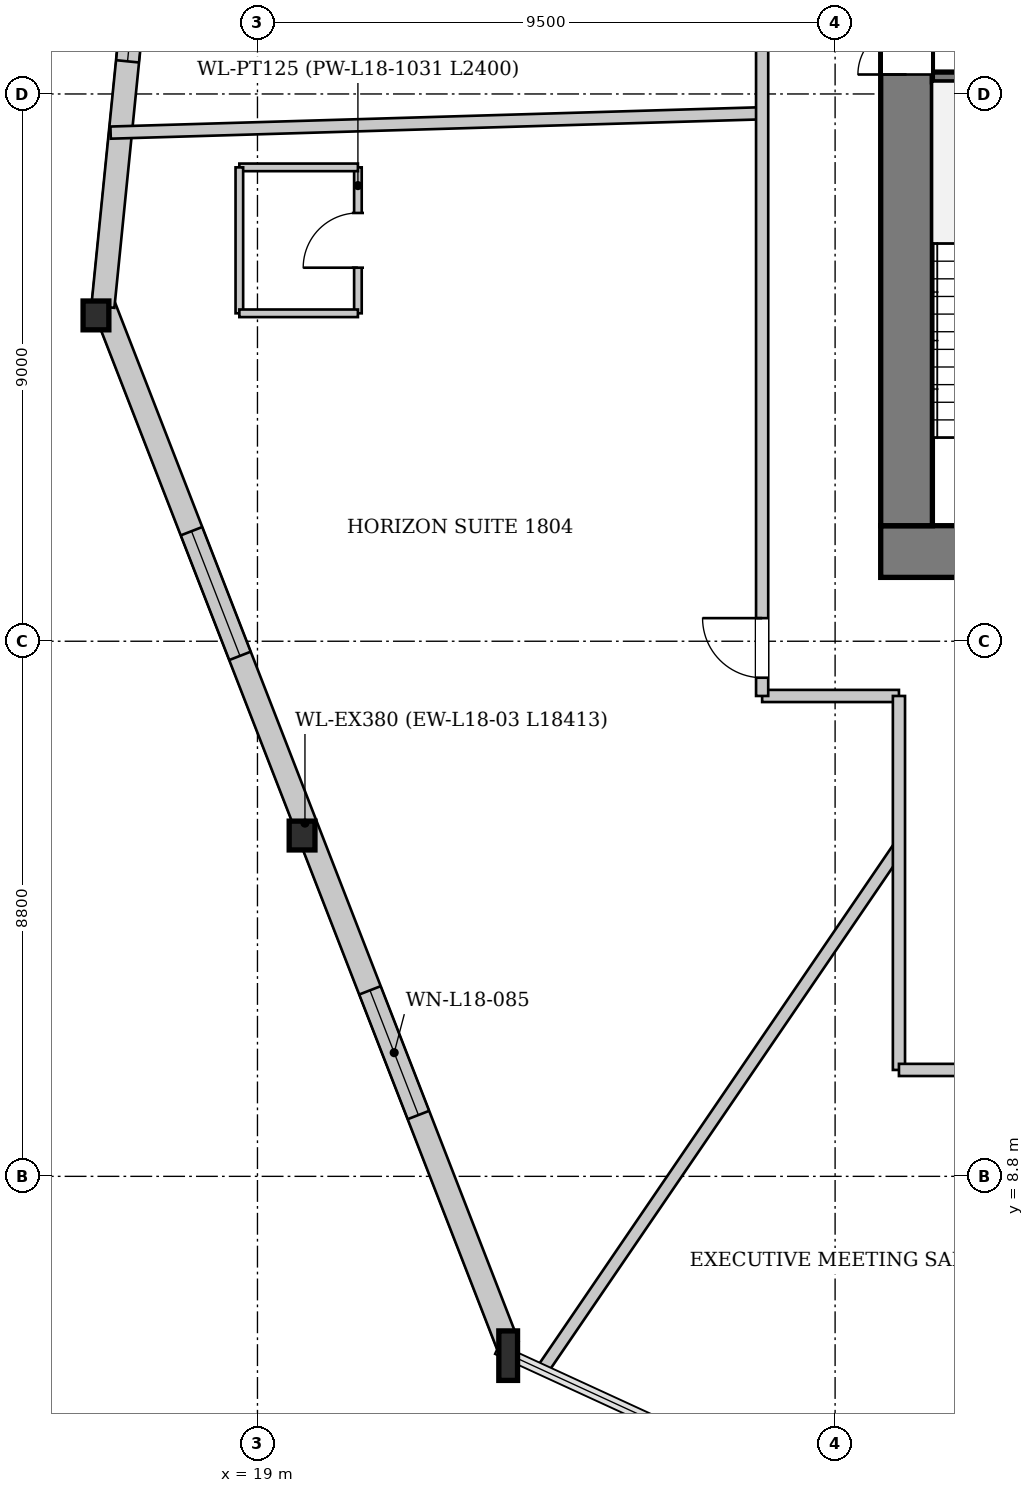
"""IFC4 building model, lengths in metres.
Left out: names, types, materials, properties, quantities, classifications, styles, units other than length and angle.
Written with IfcOpenShell. Run it as: python <this file> out.ifc"""

import sys

from ifc_helpers import new_model, si_unit, direction, frame, frame_2d, origin, origin_2d, place, context, subcontext, project, spatial, rectangle, i_section, extrude, source, transform, mapped, element, fill, save


model = new_model("IFC4")
c1 = context("Model", 3, precision=1e-05, world=origin(), true_north=direction((0.0, 1.0)))
c2 = subcontext(c1, "Body", "Model", "MODEL_VIEW")
j1 = project(units=[si_unit("LENGTHUNIT", "METRE"), si_unit("PLANEANGLEUNIT", "RADIAN")], contexts=[c1])
p1 = place(None, origin())
s1 = spatial("IfcSite", under=j1, at=p1, CompositionType="ELEMENT")
p2 = place(p1, origin())
s2 = spatial("IfcBuilding", under=s1, at=p2, CompositionType="ELEMENT")
p3 = place(p2, frame((0.0, 0.0, 71.9)))
s3 = spatial("IfcBuildingStorey", under=s2, at=p3, CompositionType="ELEMENT", Elevation=71.9)
m1 = source(origin(), c2, "Body", "SweptSolid", [
    extrude(i_section(OverallWidth=0.424, OverallDepth=0.474, WebThickness=0.043, FlangeThickness=0.068, at=origin_2d()), origin(), (0.0, 0.0, 1.0), 3.852),
])
p4 = place(p3, frame((16.269, 23.121, 0.0), z_axis=(0.039042769409, -0.084550412974, 0.995654001058), x_axis=(0.907879691662, 0.419230802147, 0.0)))
e1 = element("IfcColumn", 1, at=p4, inside=s3, PredefinedType="COLUMN", context=c2, shape_type="MappedRepresentation", body=[
    mapped(m1, transform((0.0, 0.0, 0.0), x_axis=(1.0, 0.0, 0.0), y_axis=(0.0, 1.0, 0.0), z_axis=(0.0, 0.0, 1.0), scale=1.0)),
])
m2 = source(origin(), c2, "Body", "SweptSolid", [
    extrude(i_section(OverallWidth=0.424, OverallDepth=0.474, WebThickness=0.043, FlangeThickness=0.068, at=origin_2d()), origin(), (0.0, 0.0, 1.0), 3.854),
])
p5 = place(p3, frame((19.604, 14.54, 0.0), z_axis=(0.067283898788, -0.070261623122, 0.995256841866), x_axis=(0.722245711636, 0.691636560647, 0.0)))
e2 = element("IfcColumn", 2, at=p5, inside=s3, PredefinedType="COLUMN", context=c2, shape_type="MappedRepresentation", body=[
    mapped(m2, transform((0.0, 0.0, 0.0), x_axis=(1.0, 0.0, 0.0), y_axis=(0.0, 1.0, 0.0), z_axis=(0.0, 0.0, 1.0), scale=1.0)),
])
m3 = source(origin(), c2, "Body", "SweptSolid", [
    extrude(i_section(OverallWidth=0.308, OverallDepth=0.814, WebThickness=0.021, FlangeThickness=0.04, at=origin_2d()), origin(), (0.0, 0.0, 1.0), 3.859),
])
p6 = place(p3, frame((22.939, 5.959, 0.0), z_axis=(0.095281359124, -0.055992033748, 0.99387441599), x_axis=(0.506644802413, 0.862154884106, 0.0)))
e3 = element("IfcColumn", 3, at=p6, inside=s3, PredefinedType="COLUMN", context=c2, shape_type="MappedRepresentation", body=[
    mapped(m3, transform((0.0, 0.0, 0.0), x_axis=(1.0, 0.0, 0.0), y_axis=(0.0, 1.0, 0.0), z_axis=(0.0, 0.0, 1.0), scale=1.0)),
])
p7 = place(p3, frame((23.116, 6.028, 0.0), z_axis=(0.0, 0.0, 1.0), x_axis=(-0.362290127774, 0.932065375023, 0.0)))
e4 = element("IfcWall", 4, at=p7, inside=s3, PredefinedType="SOLIDWALL", context=c2, shape_type="SweptSolid", body=[
    extrude(rectangle(XDim=18.412, YDim=0.38, at=frame_2d((9.206, 0.0))), origin(), (0.0, 0.0, 1.0), 3.042),
])
p8 = place(p7, frame((4.056, 0.0, 0.65)))
e5 = element("IfcOpeningElement", 5, at=p8, cuts=e4, PredefinedType="OPENING", context=c2, shape_type="SweptSolid", body=[
    extrude(rectangle(XDim=2.2, YDim=2.25, at=frame_2d((1.1, 1.125))), frame((0.0, 0.2, 0.0), z_axis=(0.0, -1.0, 0.0), x_axis=(1.0, 0.0, 0.0)), (0.0, 0.0, 1.0), 0.4),
])
p9 = place(p7, frame((12.157, 0.0, 0.65)))
e6 = element("IfcOpeningElement", 6, at=p9, cuts=e4, PredefinedType="OPENING", context=c2, shape_type="SweptSolid", body=[
    extrude(rectangle(XDim=2.2, YDim=2.25, at=frame_2d((1.1, 1.125))), frame((0.0, 0.2, 0.0), z_axis=(0.0, -1.0, 0.0), x_axis=(1.0, 0.0, 0.0)), (0.0, 0.0, 1.0), 0.4),
])
p10 = place(p3, frame((16.458, 23.102, 0.0), z_axis=(0.0, 0.0, 1.0), x_axis=(0.099977641191, 0.994989683998, 0.0)))
e7 = element("IfcWall", 7, at=p10, inside=s3, PredefinedType="SOLIDWALL", context=c2, shape_type="SweptSolid", body=[
    extrude(rectangle(XDim=18.412, YDim=0.38, at=frame_2d((9.206, 0.0))), origin(), (0.0, 0.0, 1.0), 3.042),
])
p11 = place(p10, frame((4.055, 0.0, 0.65)))
e8 = element("IfcOpeningElement", 8, at=p11, cuts=e7, PredefinedType="OPENING", context=c2, shape_type="SweptSolid", body=[
    extrude(rectangle(XDim=2.2, YDim=2.25, at=frame_2d((1.1, 1.125))), frame((0.0, 0.2, 0.0), z_axis=(0.0, -1.0, 0.0), x_axis=(1.0, 0.0, 0.0)), (0.0, 0.0, 1.0), 0.4),
])
p12 = place(p10, frame((12.157, 0.0, 0.65)))
e9 = element("IfcOpeningElement", 9, at=p12, cuts=e7, PredefinedType="OPENING", context=c2, shape_type="SweptSolid", body=[
    extrude(rectangle(XDim=2.2, YDim=2.25, at=frame_2d((1.1, 1.125))), frame((0.0, 0.2, 0.0), z_axis=(0.0, -1.0, 0.0), x_axis=(1.0, 0.0, 0.0)), (0.0, 0.0, 1.0), 0.4),
])
p13 = place(p3, frame((46.75, 19.075, 0.0), z_axis=(0.0, 0.0, 1.0), x_axis=(-1.0, 0.0, 0.0)))
e10 = element("IfcWall", 10, at=p13, inside=s3, PredefinedType="SHEAR", context=c2, shape_type="SweptSolid", body=[
    extrude(rectangle(XDim=17.5, YDim=0.85, at=frame_2d((8.75, 0.0))), origin(), (0.0, 0.0, 1.0), 3.75),
])
p14 = place(p13, frame((4.95, 0.0, 0.0)))
e11 = element("IfcOpeningElement", 11, at=p14, cuts=e10, PredefinedType="OPENING", context=c2, shape_type="SweptSolid", body=[
    extrude(rectangle(XDim=1.12, YDim=2.25, at=frame_2d((0.56, 1.125))), frame((0.0, 0.435, 0.0), z_axis=(0.0, -1.0, 0.0), x_axis=(1.0, 0.0, 0.0)), (0.0, 0.0, 1.0), 0.87),
])
p15 = place(p13, frame((11.45, 0.0, 0.0)))
e12 = element("IfcOpeningElement", 12, at=p15, cuts=e10, PredefinedType="OPENING", context=c2, shape_type="SweptSolid", body=[
    extrude(rectangle(XDim=1.12, YDim=2.25, at=frame_2d((0.56, 1.125))), frame((0.0, 0.435, 0.0), z_axis=(0.0, -1.0, 0.0), x_axis=(1.0, 0.0, 0.0)), (0.0, 0.0, 1.0), 0.87),
])
p16 = place(p3, frame((29.675, 19.5, 0.0), z_axis=(0.0, 0.0, 1.0), x_axis=(0.0, 1.0, 0.0)))
e13 = element("IfcWall", 13, at=p16, inside=s3, PredefinedType="SHEAR", context=c2, shape_type="SweptSolid", body=[
    extrude(rectangle(XDim=14.2, YDim=0.85, at=frame_2d((7.1, 0.0))), origin(), (0.0, 0.0, 1.0), 3.75),
])
p17 = place(p16, frame((7.42, 0.0, 0.0)))
e14 = element("IfcOpeningElement", 14, at=p17, cuts=e13, PredefinedType="OPENING", context=c2, shape_type="SweptSolid", body=[
    extrude(rectangle(XDim=1.6, YDim=2.2, at=frame_2d((0.8, 1.1))), frame((0.0, 0.435, 0.0), z_axis=(0.0, -1.0, 0.0), x_axis=(1.0, 0.0, 0.0)), (0.0, 0.0, 1.0), 0.87),
])
p18 = place(p3, frame((30.1, 26.88, 0.0), z_axis=(0.0, 0.0, 1.0), x_axis=(1.0, 0.0, 0.0)))
e15 = element("IfcWall", 15, at=p18, inside=s3, PredefinedType="PARTITIONING", context=c2, shape_type="SweptSolid", body=[
    extrude(rectangle(XDim=3.02, YDim=0.16, at=frame_2d((1.51, 0.0))), origin(), (0.0, 0.0, 1.0), 3.75),
])
p19 = place(p3, frame((27.3, 26.282, 0.0), z_axis=(0.0, 0.0, 1.0), x_axis=(-0.999559606693, -0.029674781671, 0.0)))
e16 = element("IfcWall", 16, at=p19, inside=s3, PredefinedType="PARTITIONING", context=c2, shape_type="SweptSolid", body=[
    extrude(rectangle(XDim=10.72, YDim=0.2, at=frame_2d((5.36, 0.0))), origin(), (0.0, 0.0, 1.0), 3.75),
])
p20 = place(p3, frame((29.55, 14.213, 0.0), z_axis=(0.0, 0.0, 1.0), x_axis=(-0.563519334803, -0.826102874528, 0.0)))
e17 = element("IfcWall", 17, at=p20, inside=s3, PredefinedType="PARTITIONING", context=c2, shape_type="SweptSolid", body=[
    extrude(rectangle(XDim=10.376, YDim=0.2, at=frame_2d((5.188, 0.0))), origin(), (0.0, 0.0, 1.0), 3.245),
])
p21 = place(p3, frame((20.652, 22.993, 0.0), z_axis=(0.0, 0.0, 1.0), x_axis=(0.0, 1.0, 0.0)))
e18 = element("IfcWall", 18, at=p21, inside=s3, PredefinedType="PARTITIONING", context=c2, shape_type="SweptSolid", body=[
    extrude(rectangle(XDim=2.4, YDim=0.125, at=frame_2d((1.2, 0.0))), origin(), (0.0, 0.0, 1.0), 3.75),
])
p22 = place(p21, frame((0.75, 0.0, 0.0)))
e19 = element("IfcOpeningElement", 19, at=p22, cuts=e18, PredefinedType="OPENING", context=c2, shape_type="SweptSolid", body=[
    extrude(rectangle(XDim=0.9, YDim=2.1, at=frame_2d((0.45, 1.05))), frame((0.0, 0.073, 0.0), z_axis=(0.0, -1.0, 0.0), x_axis=(1.0, 0.0, 0.0)), (0.0, 0.0, 1.0), 0.145),
])
p23 = place(p3, frame((20.652, 25.393, 0.0), z_axis=(0.0, 0.0, 1.0), x_axis=(-1.0, 0.0, 0.0)))
e20 = element("IfcWall", 20, at=p23, inside=s3, PredefinedType="PARTITIONING", context=c2, shape_type="SweptSolid", body=[
    extrude(rectangle(XDim=1.95, YDim=0.125, at=frame_2d((0.975, 0.0))), origin(), (0.0, 0.0, 1.0), 3.75),
])
p24 = place(p3, frame((18.702, 25.393, 0.0), z_axis=(0.0, 0.0, 1.0), x_axis=(0.0, -1.0, 0.0)))
e21 = element("IfcWall", 21, at=p24, inside=s3, PredefinedType="PARTITIONING", context=c2, shape_type="SweptSolid", body=[
    extrude(rectangle(XDim=2.4, YDim=0.125, at=frame_2d((1.2, 0.0))), origin(), (0.0, 0.0, 1.0), 3.75),
])
p25 = place(p3, frame((18.702, 22.993, 0.0), z_axis=(0.0, 0.0, 1.0), x_axis=(1.0, 0.0, 0.0)))
e22 = element("IfcWall", 22, at=p25, inside=s3, PredefinedType="PARTITIONING", context=c2, shape_type="SweptSolid", body=[
    extrude(rectangle(XDim=1.95, YDim=0.125, at=frame_2d((0.975, 0.0))), origin(), (0.0, 0.0, 1.0), 3.235),
])
p26 = place(p3, frame((27.3, 16.7, 0.0), z_axis=(0.0, 0.0, 1.0), x_axis=(1.0, 0.0, 0.0)))
e23 = element("IfcWall", 23, at=p26, inside=s3, PredefinedType="PARTITIONING", context=c2, shape_type="SweptSolid", body=[
    extrude(rectangle(XDim=2.25, YDim=0.2, at=frame_2d((1.125, 0.0))), origin(), (0.0, 0.0, 1.0), 3.75),
])
p27 = place(p3, frame((27.3, 16.7, 0.0), z_axis=(0.0, 0.0, 1.0), x_axis=(0.0, 1.0, 0.0)))
e24 = element("IfcWall", 24, at=p27, inside=s3, PredefinedType="PARTITIONING", context=c2, shape_type="SweptSolid", body=[
    extrude(rectangle(XDim=19.8, YDim=0.2, at=frame_2d((9.9, 0.0))), origin(), (0.0, 0.0, 1.0), 3.75),
])
p28 = place(p27, frame((14.2, 0.0, 0.0)))
e25 = element("IfcOpeningElement", 25, at=p28, cuts=e24, PredefinedType="OPENING", context=c2, shape_type="SweptSolid", body=[
    extrude(rectangle(XDim=0.98, YDim=2.15, at=frame_2d((0.49, 1.075))), frame((0.0, 0.11, 0.0), z_axis=(0.0, -1.0, 0.0), x_axis=(1.0, 0.0, 0.0)), (0.0, 0.0, 1.0), 0.22),
])
p29 = place(p27, frame((0.3, 0.0, 0.0)))
e26 = element("IfcOpeningElement", 26, at=p29, cuts=e24, PredefinedType="OPENING", context=c2, shape_type="SweptSolid", body=[
    extrude(rectangle(XDim=0.98, YDim=2.15, at=frame_2d((0.49, 1.075))), frame((0.0, 0.11, 0.0), z_axis=(0.0, -1.0, 0.0), x_axis=(1.0, 0.0, 0.0)), (0.0, 0.0, 1.0), 0.22),
])
p30 = place(p3, frame((29.55, 10.55, 0.0), z_axis=(0.0, 0.0, 1.0), x_axis=(0.0, 1.0, 0.0)))
e27 = element("IfcWall", 27, at=p30, inside=s3, PredefinedType="PARTITIONING", context=c2, shape_type="SweptSolid", body=[
    extrude(rectangle(XDim=6.15, YDim=0.2, at=frame_2d((3.075, 0.0))), origin(), (0.0, 0.0, 1.0), 3.75),
])
p31 = place(p3, frame((29.55, 10.55, 0.0), z_axis=(0.0, 0.0, 1.0), x_axis=(1.0, 0.0, 0.0)))
e28 = element("IfcWall", 28, at=p31, inside=s3, PredefinedType="PARTITIONING", context=c2, shape_type="SweptSolid", body=[
    extrude(rectangle(XDim=10.3, YDim=0.2, at=frame_2d((5.15, 0.0))), origin(), (0.0, 0.0, 1.0), 3.75),
])
m4 = source(origin(), c2, "Body", "SweptSolid", [
    extrude(rectangle(XDim=2.2, YDim=2.25, at=frame_2d((1.1, 1.125))), frame((0.0, 0.03, 0.0), z_axis=(0.0, -1.0, 0.0), x_axis=(1.0, 0.0, 0.0)), (0.0, 0.0, 1.0), 0.06),
])
p32 = place(p8, origin())
e29 = element("IfcWindow", 29, at=p32, inside=s3, PartitioningType="SINGLE_PANEL", PredefinedType="WINDOW", context=c2, shape_type="MappedRepresentation", body=[
    mapped(m4, transform((0.0, 0.0, 0.0), x_axis=(1.0, 0.0, 0.0), y_axis=(0.0, 1.0, 0.0), z_axis=(0.0, 0.0, 1.0), scale=1.0)),
])
fill(e5, e29)
p33 = place(p9, origin())
e30 = element("IfcWindow", 30, at=p33, inside=s3, PartitioningType="SINGLE_PANEL", PredefinedType="WINDOW", context=c2, shape_type="MappedRepresentation", body=[
    mapped(m4, transform((0.0, 0.0, 0.0), x_axis=(1.0, 0.0, 0.0), y_axis=(0.0, 1.0, 0.0), z_axis=(0.0, 0.0, 1.0), scale=1.0)),
])
fill(e6, e30)
p34 = place(p11, origin())
e31 = element("IfcWindow", 31, at=p34, inside=s3, PartitioningType="SINGLE_PANEL", PredefinedType="WINDOW", context=c2, shape_type="MappedRepresentation", body=[
    mapped(m4, transform((0.0, 0.0, 0.0), x_axis=(1.0, 0.0, 0.0), y_axis=(0.0, 1.0, 0.0), z_axis=(0.0, 0.0, 1.0), scale=1.0)),
])
fill(e8, e31)
m5 = source(origin(), c2, "Body", "SweptSolid", [
    extrude(rectangle(XDim=1.6, YDim=2.2, at=frame_2d((0.8, 1.1))), frame((0.0, 0.025, 0.0), z_axis=(0.0, -1.0, 0.0), x_axis=(1.0, 0.0, 0.0)), (0.0, 0.0, 1.0), 0.05),
])
p35 = place(p17, origin())
e32 = element("IfcDoor", 32, at=p35, inside=s3, OperationType="DOUBLE_DOOR_SINGLE_SWING", PredefinedType="DOOR", context=c2, shape_type="MappedRepresentation", body=[
    mapped(m5, transform((0.0, 0.0, 0.0), x_axis=(1.0, 0.0, 0.0), y_axis=(0.0, 1.0, 0.0), z_axis=(0.0, 0.0, 1.0), scale=1.0)),
])
fill(e14, e32)
m6 = source(origin(), c2, "Body", "SweptSolid", [
    extrude(rectangle(XDim=0.9, YDim=2.1, at=frame_2d((0.45, 1.05))), frame((0.0, 0.025, 0.0), z_axis=(0.0, -1.0, 0.0), x_axis=(1.0, 0.0, 0.0)), (0.0, 0.0, 1.0), 0.05),
])
p36 = place(p22, origin())
e33 = element("IfcDoor", 33, at=p36, inside=s3, OperationType="SINGLE_SWING_LEFT", PredefinedType="DOOR", context=c2, shape_type="MappedRepresentation", body=[
    mapped(m6, transform((0.0, 0.0, 0.0), x_axis=(1.0, 0.0, 0.0), y_axis=(0.0, 1.0, 0.0), z_axis=(0.0, 0.0, 1.0), scale=1.0)),
])
fill(e19, e33)
m7 = source(origin(), c2, "Body", "SweptSolid", [
    extrude(rectangle(XDim=0.98, YDim=2.15, at=frame_2d((0.49, 1.075))), frame((0.0, 0.025, 0.0), z_axis=(0.0, -1.0, 0.0), x_axis=(1.0, 0.0, 0.0)), (0.0, 0.0, 1.0), 0.05),
])
p37 = place(p29, origin())
e34 = element("IfcDoor", 34, at=p37, inside=s3, OperationType="SINGLE_SWING_RIGHT", PredefinedType="DOOR", context=c2, shape_type="MappedRepresentation", body=[
    mapped(m7, transform((0.0, 0.0, 0.0), x_axis=(1.0, 0.0, 0.0), y_axis=(0.0, 1.0, 0.0), z_axis=(0.0, 0.0, 1.0), scale=1.0)),
])
fill(e26, e34)
save(model, sys.argv[1])
